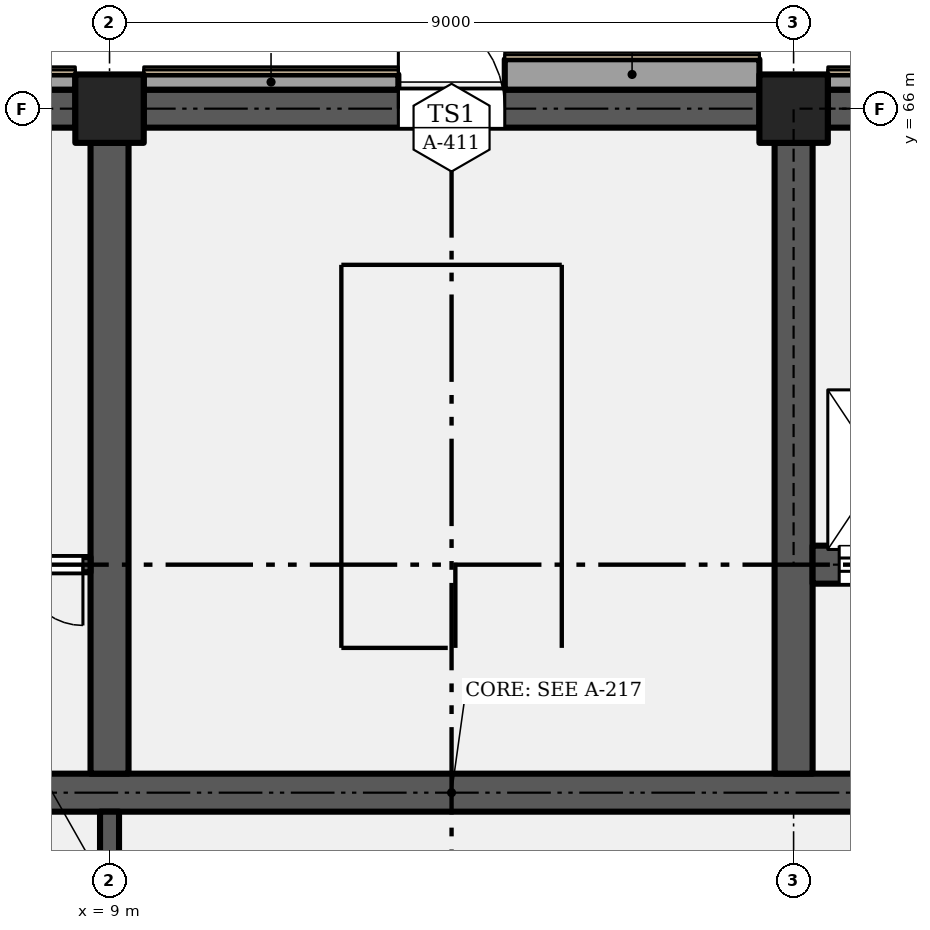
"""IFC4 building model, lengths in metres.
Left out: names, types, materials, properties, quantities, classifications, styles, units other than length and angle.
Written with IfcOpenShell. Run it as: python <this file> out.ifc"""

import sys

from ifc_helpers import new_model, si_unit, direction, frame, frame_2d, origin, origin_2d, place, context, subcontext, project, spatial, rectangle, extrude, element, fill, save


model = new_model("IFC4")
c1 = context("Model", 3, precision=1e-05, world=origin(), true_north=direction((0.0, 1.0)))
c2 = subcontext(c1, "Body", "Model", "MODEL_VIEW")
j1 = project(units=[si_unit("LENGTHUNIT", "METRE"), si_unit("PLANEANGLEUNIT", "RADIAN")], contexts=[c1])
p1 = place(None, origin())
s1 = spatial("IfcSite", under=j1, at=p1, CompositionType="ELEMENT")
p2 = place(p1, origin())
s2 = spatial("IfcBuilding", under=s1, at=p2, CompositionType="ELEMENT")
p3 = place(p2, origin())
s3 = spatial("IfcBuildingStorey", under=s2, at=p3, CompositionType="ELEMENT", Elevation=0.0)
for number, where, z_axis, x_axis in (
    (1, (9.0, 66.0, 0.0), (0.0, 0.0, 1.0), (1.0, 0.0, 0.0)),
    (2, (18.0, 66.0, 0.0), (0.0, 0.0, 1.0), (1.0, 0.0, 0.0)),
):
    element("IfcColumn", number, at=place(p3, frame(where, z_axis=z_axis, x_axis=x_axis)), inside=s3, PredefinedType="COLUMN", context=c2, shape_type="SweptSolid", body=[
        extrude(rectangle(XDim=0.9, YDim=0.9, at=origin_2d()), origin(), (0.0, 0.0, 1.0), 6.6),
    ])
p4 = place(p3, frame((-0.25, 57.0, 0.0), z_axis=(0.0, 0.0, 1.0), x_axis=(1.0, 0.0, 0.0)))
e3 = element("IfcWall", 3, at=p4, inside=s3, PredefinedType="SHEAR", context=c2, shape_type="SweptSolid", body=[
    extrude(rectangle(XDim=27.5, YDim=0.5, at=frame_2d((13.75, 0.0))), origin(), (0.0, 0.0, 1.0), 6.3),
])
p5 = place(p4, frame((1.9, 0.0, 0.0)))
e4 = element("IfcOpeningElement", 4, at=p5, cuts=e3, PredefinedType="OPENING", context=c2, shape_type="SweptSolid", body=[
    extrude(rectangle(XDim=1.2, YDim=2.1, at=frame_2d((0.6, 1.05))), frame((0.0, 0.26, 0.0), z_axis=(0.0, -1.0, 0.0), x_axis=(1.0, 0.0, 0.0)), (0.0, 0.0, 1.0), 0.52),
])
p6 = place(p4, frame((7.6, 0.0, 0.0), z_axis=(0.0, 0.0, 1.0), x_axis=(-1.0, 0.0, 0.0)))
e5 = element("IfcOpeningElement", 5, at=p6, cuts=e3, PredefinedType="OPENING", context=c2, shape_type="SweptSolid", body=[
    extrude(rectangle(XDim=1.2, YDim=2.1, at=frame_2d((0.6, 1.05))), frame((0.0, 0.26, 0.0), z_axis=(0.0, -1.0, 0.0), x_axis=(1.0, 0.0, 0.0)), (0.0, 0.0, 1.0), 0.52),
])
p7 = place(p4, frame((21.1, 0.0, 0.0), z_axis=(0.0, 0.0, 1.0), x_axis=(-1.0, 0.0, 0.0)))
e6 = element("IfcOpeningElement", 6, at=p7, cuts=e3, PredefinedType="OPENING", context=c2, shape_type="SweptSolid", body=[
    extrude(rectangle(XDim=1.2, YDim=2.1, at=frame_2d((0.6, 1.05))), frame((0.0, 0.26, 0.0), z_axis=(0.0, -1.0, 0.0), x_axis=(1.0, 0.0, 0.0)), (0.0, 0.0, 1.0), 0.52),
])
p8 = place(p4, frame((24.4, 0.0, 0.0)))
e7 = element("IfcOpeningElement", 7, at=p8, cuts=e3, PredefinedType="OPENING", context=c2, shape_type="SweptSolid", body=[
    extrude(rectangle(XDim=1.2, YDim=2.1, at=frame_2d((0.6, 1.05))), frame((0.0, 0.26, 0.0), z_axis=(0.0, -1.0, 0.0), x_axis=(1.0, 0.0, 0.0)), (0.0, 0.0, 1.0), 0.52),
])
for number, where, z_axis, x_axis in (
    (8, (9.0, 57.25, 0.0), (0.0, 0.0, 1.0), (0.0, 1.0, 0.0)),
    (9, (18.0, 57.25, 0.0), (0.0, 0.0, 1.0), (0.0, 1.0, 0.0)),
):
    element("IfcWall", number, at=place(p3, frame(where, z_axis=z_axis, x_axis=x_axis)), inside=s3, PredefinedType="SHEAR", context=c2, shape_type="SweptSolid", body=[
        extrude(rectangle(XDim=8.3, YDim=0.5, at=frame_2d((4.15, 0.0))), origin(), (0.0, 0.0, 1.0), 6.3),
    ])
p9 = place(p3, frame((18.25, 60.0, 0.0), z_axis=(0.0, 0.0, 1.0), x_axis=(1.0, 0.0, 0.0)))
e10 = element("IfcWall", 10, at=p9, inside=s3, PredefinedType="SHEAR", context=c2, shape_type="SweptSolid", body=[
    extrude(rectangle(XDim=4.0, YDim=0.5, at=frame_2d((2.0, 0.0))), origin(), (0.0, 0.0, 1.0), 6.3),
])
p10 = place(p9, frame((0.35, 0.0, 0.0)))
e11 = element("IfcOpeningElement", 11, at=p10, cuts=e10, PredefinedType="OPENING", context=c2, shape_type="SweptSolid", body=[
    extrude(rectangle(XDim=1.1, YDim=2.1, at=frame_2d((0.55, 1.05))), frame((0.0, 0.26, 0.0), z_axis=(0.0, -1.0, 0.0), x_axis=(1.0, 0.0, 0.0)), (0.0, 0.0, 1.0), 0.52),
])
p11 = place(p9, frame((2.5, 0.0, 0.0)))
e12 = element("IfcOpeningElement", 12, at=p11, cuts=e10, PredefinedType="OPENING", context=c2, shape_type="SweptSolid", body=[
    extrude(rectangle(XDim=1.1, YDim=2.1, at=frame_2d((0.55, 1.05))), frame((0.0, 0.26, 0.0), z_axis=(0.0, -1.0, 0.0), x_axis=(1.0, 0.0, 0.0)), (0.0, 0.0, 1.0), 0.52),
])
p12 = place(p3, frame((0.45, 66.0, 0.0), z_axis=(0.0, 0.0, 1.0), x_axis=(1.0, 0.0, 0.0)))
e13 = element("IfcWall", 13, at=p12, inside=s3, PredefinedType="SHEAR", context=c2, shape_type="SweptSolid", body=[
    extrude(rectangle(XDim=8.1, YDim=0.5, at=frame_2d((4.05, 0.0))), origin(), (0.0, 0.0, 1.0), 6.3),
])
p13 = place(p3, frame((9.45, 66.0, 0.0), z_axis=(0.0, 0.0, 1.0), x_axis=(1.0, 0.0, 0.0)))
e14 = element("IfcWall", 14, at=p13, inside=s3, PredefinedType="SHEAR", context=c2, shape_type="SweptSolid", body=[
    extrude(rectangle(XDim=8.1, YDim=0.5, at=frame_2d((4.05, 0.0))), origin(), (0.0, 0.0, 1.0), 6.3),
])
p14 = place(p13, frame((3.35, 0.0, 0.0)))
e15 = element("IfcOpeningElement", 15, at=p14, cuts=e14, PredefinedType="OPENING", context=c2, shape_type="SweptSolid", body=[
    extrude(rectangle(XDim=1.4, YDim=2.1, at=frame_2d((0.7, 1.05))), frame((0.0, 0.26, 0.0), z_axis=(0.0, -1.0, 0.0), x_axis=(1.0, 0.0, 0.0)), (0.0, 0.0, 1.0), 0.52),
])
p15 = place(p3, frame((18.45, 66.0, 0.0), z_axis=(0.0, 0.0, 1.0), x_axis=(1.0, 0.0, 0.0)))
e16 = element("IfcWall", 16, at=p15, inside=s3, PredefinedType="SHEAR", context=c2, shape_type="SweptSolid", body=[
    extrude(rectangle(XDim=8.1, YDim=0.5, at=frame_2d((4.05, 0.0))), origin(), (0.0, 0.0, 1.0), 6.3),
])
p16 = place(p3, frame((0.45, 66.35, 0.0), z_axis=(0.0, 0.0, 1.0), x_axis=(1.0, 0.0, 0.0)))
e17 = element("IfcWall", 17, at=p16, inside=s3, PredefinedType="SOLIDWALL", context=c2, shape_type="SweptSolid", body=[
    extrude(rectangle(XDim=8.1, YDim=0.2, at=frame_2d((4.05, 0.0))), origin(), (0.0, 0.0, 1.0), 6.3),
])
p17 = place(p3, frame((9.45, 66.35, 0.0), z_axis=(0.0, 0.0, 1.0), x_axis=(1.0, 0.0, 0.0)))
e18 = element("IfcWall", 18, at=p17, inside=s3, PredefinedType="SOLIDWALL", context=c2, shape_type="SweptSolid", body=[
    extrude(rectangle(XDim=3.35, YDim=0.2, at=frame_2d((1.675, 0.0))), origin(), (0.0, 0.0, 1.0), 6.3),
])
p18 = place(p3, frame((14.2, 66.45, 0.0), z_axis=(0.0, 0.0, 1.0), x_axis=(1.0, 0.0, 0.0)))
e19 = element("IfcWall", 19, at=p18, inside=s3, PredefinedType="SOLIDWALL", context=c2, shape_type="SweptSolid", body=[
    extrude(rectangle(XDim=3.35, YDim=0.4, at=frame_2d((1.675, 0.0))), origin(), (0.0, 0.0, 1.0), 6.3),
])
p19 = place(p3, frame((18.45, 66.35, 0.0), z_axis=(0.0, 0.0, 1.0), x_axis=(1.0, 0.0, 0.0)))
e20 = element("IfcWall", 20, at=p19, inside=s3, PredefinedType="SOLIDWALL", context=c2, shape_type="SweptSolid", body=[
    extrude(rectangle(XDim=8.1, YDim=0.2, at=frame_2d((4.05, 0.0))), origin(), (0.0, 0.0, 1.0), 6.3),
])
p20 = place(p3, frame((7.5, 60.0, 0.0), z_axis=(0.0, 0.0, 1.0), x_axis=(1.0, 0.0, 0.0)))
e21 = element("IfcWall", 21, at=p20, inside=s3, PredefinedType="SHEAR", context=c2, shape_type="SweptSolid", body=[
    extrude(rectangle(XDim=1.25, YDim=0.2, at=frame_2d((0.625, 0.0))), origin(), (0.0, 0.0, 1.0), 6.3),
])
p21 = place(p20, frame((1.15, 0.0, 0.0), z_axis=(0.0, 0.0, 1.0), x_axis=(-1.0, 0.0, 0.0)))
e22 = element("IfcOpeningElement", 22, at=p21, cuts=e21, PredefinedType="OPENING", context=c2, shape_type="SweptSolid", body=[
    extrude(rectangle(XDim=0.8, YDim=2.0, at=frame_2d((0.4, 1.0))), frame((0.0, 0.11, 0.0), z_axis=(0.0, -1.0, 0.0), x_axis=(1.0, 0.0, 0.0)), (0.0, 0.0, 1.0), 0.22),
])
p22 = place(p3, frame((9.0, 54.6, 0.0), z_axis=(0.0, 0.0, 1.0), x_axis=(0.0, 1.0, 0.0)))
e23 = element("IfcWall", 23, at=p22, inside=s3, PredefinedType="SHEAR", context=c2, shape_type="SweptSolid", body=[
    extrude(rectangle(XDim=2.15, YDim=0.25, at=frame_2d((1.075, 0.0))), origin(), (0.0, 0.0, 1.0), 6.3),
])
p23 = place(p14, origin())
e24 = element("IfcDoor", 24, at=p23, inside=s3, OperationType="SINGLE_SWING_RIGHT", PredefinedType="DOOR", context=c2, shape_type="SweptSolid", body=[
    extrude(rectangle(XDim=1.4, YDim=2.1, at=frame_2d((0.7, 1.05))), frame((0.0, 0.025, 0.0), z_axis=(0.0, -1.0, 0.0), x_axis=(1.0, 0.0, 0.0)), (0.0, 0.0, 1.0), 0.05),
])
fill(e15, e24)
p24 = place(p21, origin())
e25 = element("IfcDoor", 25, at=p24, inside=s3, OperationType="SINGLE_SWING_LEFT", PredefinedType="DOOR", context=c2, shape_type="SweptSolid", body=[
    extrude(rectangle(XDim=0.8, YDim=2.0, at=frame_2d((0.4, 1.0))), frame((0.0, 0.025, 0.0), z_axis=(0.0, -1.0, 0.0), x_axis=(1.0, 0.0, 0.0)), (0.0, 0.0, 1.0), 0.05),
])
fill(e22, e25)
p25 = place(p10, origin())
e26 = element("IfcDoor", 26, at=p25, inside=s3, OperationType="SLIDING_TO_LEFT", PredefinedType="DOOR", context=c2, shape_type="SweptSolid", body=[
    extrude(rectangle(XDim=1.1, YDim=2.1, at=frame_2d((0.55, 1.05))), frame((0.0, 0.025, 0.0), z_axis=(0.0, -1.0, 0.0), x_axis=(1.0, 0.0, 0.0)), (0.0, 0.0, 1.0), 0.05),
])
fill(e11, e26)
save(model, sys.argv[1])
